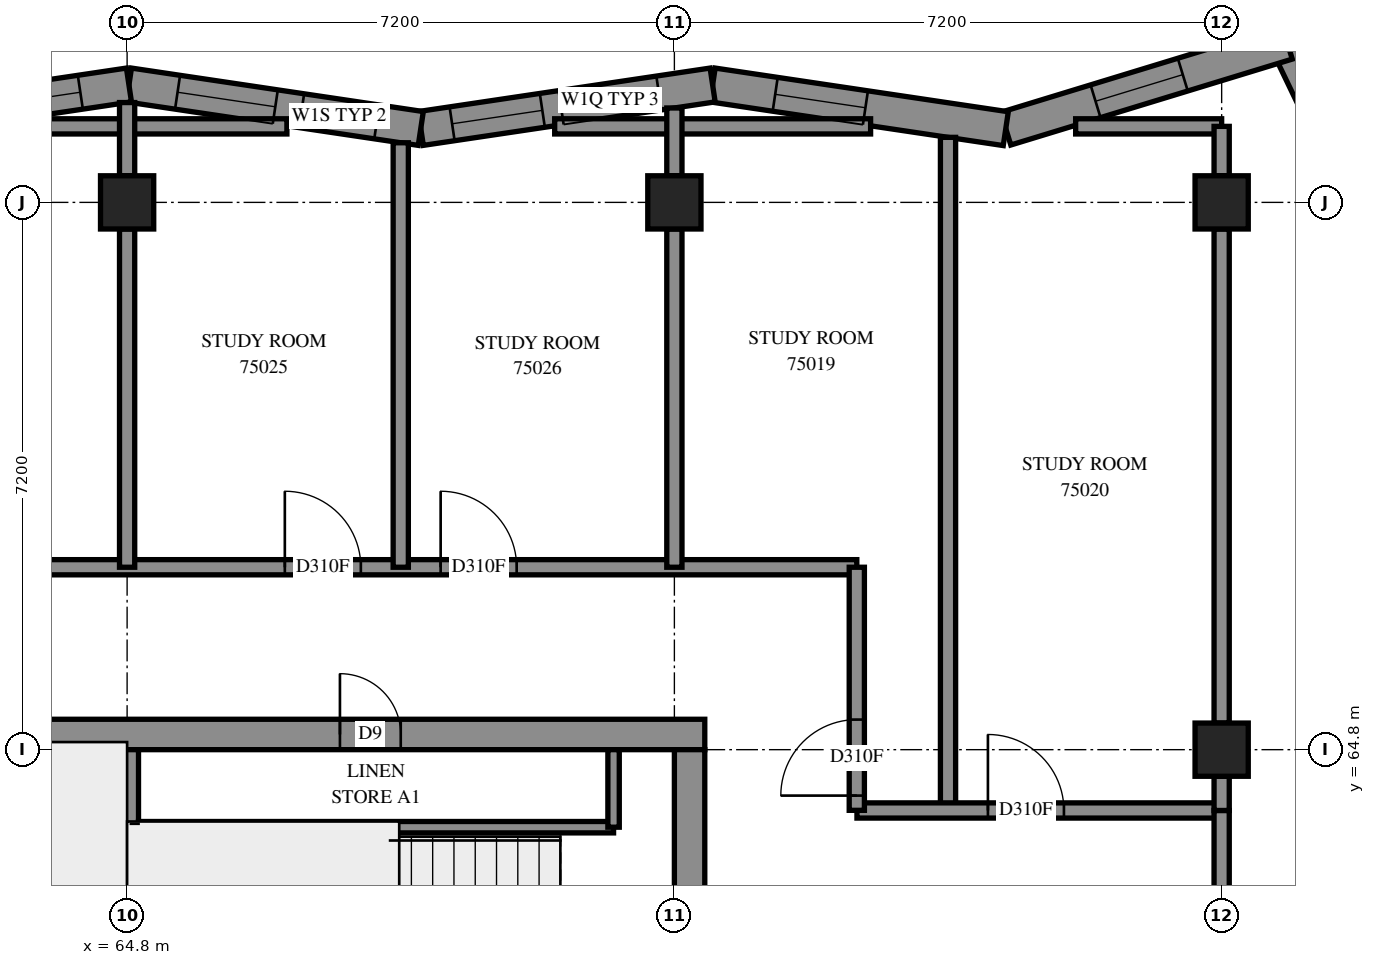
"""IFC4 building model, lengths in metres.
Left out: names, types, materials, properties, quantities, classifications, styles, units other than length and angle.
Written with IfcOpenShell. Run it as: python <this file> out.ifc"""

import sys

from ifc_helpers import new_model, si_unit, direction, frame, frame_2d, origin, origin_2d, place, context, subcontext, project, spatial, polyline, rectangle, outline, extrude, element, fill, save


model = new_model("IFC4")
c1 = context("Model", 3, precision=1e-05, world=origin(), true_north=direction((0.0, 1.0)))
c2 = subcontext(c1, "Body", "Model", "MODEL_VIEW")
j1 = project(units=[si_unit("LENGTHUNIT", "METRE"), si_unit("PLANEANGLEUNIT", "RADIAN")], contexts=[c1])
p1 = place(None, origin())
s1 = spatial("IfcSite", under=j1, at=p1, CompositionType="ELEMENT")
p2 = place(p1, origin())
s2 = spatial("IfcBuilding", under=s1, at=p2, CompositionType="ELEMENT")
p3 = place(p2, frame((0.0, 0.0, 274.4)))
s3 = spatial("IfcBuildingStorey", under=s2, at=p3, CompositionType="ELEMENT", Elevation=274.4)
for number, where, z_axis, x_axis in (
    (1, (64.8, 72.0, 0.0), (0.0, 0.0, 1.0), (1.0, 0.0, 0.0)),
    (2, (72.0, 72.0, 0.0), (0.0, 0.0, 1.0), (1.0, 0.0, 0.0)),
    (3, (79.2, 64.8, 0.0), (0.0, 0.0, 1.0), (1.0, 0.0, 0.0)),
    (4, (79.2, 72.0, 0.0), (0.0, 0.0, 1.0), (1.0, 0.0, 0.0)),
):
    element("IfcColumn", number, at=place(p3, frame(where, z_axis=z_axis, x_axis=x_axis)), inside=s3, PredefinedType="COLUMN", context=c2, shape_type="SweptSolid", body=[
        extrude(rectangle(XDim=0.7, YDim=0.7, at=origin_2d()), origin(), (0.0, 0.0, 1.0), 3.1),
    ])
p4 = place(p3, frame((57.2, 65.0, -0.3), z_axis=(0.0, 0.0, 1.0), x_axis=(1.0, 0.0, 0.0)))
e5 = element("IfcWall", 5, at=p4, inside=s3, PredefinedType="SHEAR", context=c2, shape_type="SweptSolid", body=[
    extrude(rectangle(XDim=15.2, YDim=0.4, at=frame_2d((7.6, 0.0))), origin(), (0.0, 0.0, 1.0), 2.7),
])
p5 = place(p4, frame((10.4, 0.0, 0.3)))
e6 = element("IfcOpeningElement", 6, at=p5, cuts=e5, PredefinedType="OPENING", context=c2, shape_type="SweptSolid", body=[
    extrude(rectangle(XDim=0.8, YDim=2.1, at=frame_2d((0.4, 1.05))), frame((0.0, 0.21, 0.0), z_axis=(0.0, -1.0, 0.0), x_axis=(1.0, 0.0, 0.0)), (0.0, 0.0, 1.0), 0.42),
])
p6 = place(p3, frame((72.2, 50.4, -0.3), z_axis=(0.0, 0.0, 1.0), x_axis=(0.0, 1.0, 0.0)))
e7 = element("IfcWall", 7, at=p6, inside=s3, PredefinedType="SHEAR", context=c2, shape_type="SweptSolid", body=[
    extrude(rectangle(XDim=14.4, YDim=0.4, at=frame_2d((7.2, 0.0))), origin(), (0.0, 0.0, 1.0), 2.7),
])
p7 = place(p6, frame((4.55, 0.0, 0.3)))
e8 = element("IfcOpeningElement", 8, at=p7, cuts=e7, PredefinedType="OPENING", context=c2, shape_type="SweptSolid", body=[
    extrude(rectangle(XDim=1.1, YDim=2.1, at=frame_2d((0.55, 1.05))), frame((0.0, 0.21, 0.0), z_axis=(0.0, -1.0, 0.0), x_axis=(1.0, 0.0, 0.0)), (0.0, 0.0, 1.0), 0.42),
])
p8 = place(p6, frame((11.35, 0.0, 0.3)))
e9 = element("IfcOpeningElement", 9, at=p8, cuts=e7, PredefinedType="OPENING", context=c2, shape_type="SweptSolid", body=[
    extrude(rectangle(XDim=1.1, YDim=2.1, at=frame_2d((0.55, 1.05))), frame((0.0, 0.21, 0.0), z_axis=(0.0, -1.0, 0.0), x_axis=(1.0, 0.0, 0.0)), (0.0, 0.0, 1.0), 0.42),
])
p9 = place(p3, frame((64.8, 60.6, 0.0), z_axis=(0.0, 0.0, 1.0), x_axis=(0.0, 1.0, 0.0)))
e10 = element("IfcWall", 10, at=p9, inside=s3, PredefinedType="SOLIDWALL", context=c2, shape_type="SweptSolid", body=[
    extrude(rectangle(XDim=4.2, YDim=0.3, at=frame_2d((2.1, 0.0))), origin(), (0.0, 0.0, 1.0), 3.1),
])
p10 = place(p3, frame((81.537, 71.033, 0.0), z_axis=(0.0, 0.0, 1.0), x_axis=(-0.4329584149, 0.9014138955, 0.0)))
e11 = element("IfcWall", 11, at=p10, inside=s3, PredefinedType="SOLIDWALL", context=c2, shape_type="SweptSolid", body=[
    extrude(outline(polyline([(0.058, -0.225), (3.596, -0.225), (3.21, 0.225), (-0.058, 0.225), (0.058, -0.225)])), origin(), (0.0, 0.0, 1.0), 3.1),
])
p11 = place(p10, frame((0.738, 0.0, 0.45)))
e12 = element("IfcOpeningElement", 12, at=p11, cuts=e11, PredefinedType="OPENING", context=c2, shape_type="SweptSolid", body=[
    extrude(rectangle(XDim=1.2, YDim=2.55, at=frame_2d((0.6, 1.275))), frame((0.0, 0.235, 0.0), z_axis=(0.0, -1.0, 0.0), x_axis=(1.0, 0.0, 0.0)), (0.0, 0.0, 1.0), 0.47),
])
p12 = place(p3, frame((80.063, 74.1, 0.0), z_axis=(0.0, 0.0, 1.0), x_axis=(-0.9564377374, -0.2919363877, 0.0)))
e13 = element("IfcWall", 13, at=p12, inside=s3, PredefinedType="SOLIDWALL", context=c2, shape_type="SweptSolid", body=[
    extrude(outline(polyline([(-0.193, -0.225), (3.821, -0.225), (3.923, 0.225), (0.193, 0.225), (-0.193, -0.225)])), origin(), (0.0, 0.0, 1.0), 3.1),
])
p13 = place(p12, frame((1.437, 0.0, 0.45)))
e14 = element("IfcOpeningElement", 14, at=p13, cuts=e13, PredefinedType="OPENING", context=c2, shape_type="SweptSolid", body=[
    extrude(rectangle(XDim=1.2, YDim=2.55, at=frame_2d((0.6, 1.275))), frame((0.0, 0.235, 0.0), z_axis=(0.0, -1.0, 0.0), x_axis=(1.0, 0.0, 0.0)), (0.0, 0.0, 1.0), 0.47),
])
p14 = place(p3, frame((76.36, 72.97, 0.0), z_axis=(0.0, 0.0, 1.0), x_axis=(-0.9890865204, 0.1473358586, 0.0)))
e15 = element("IfcWall", 15, at=p14, inside=s3, PredefinedType="SOLIDWALL", context=c2, shape_type="SweptSolid", body=[
    extrude(outline(polyline([(0.051, -0.225), (3.933, -0.225), (3.866, 0.225), (-0.051, 0.225), (0.051, -0.225)])), origin(), (0.0, 0.0, 1.0), 3.1),
])
p15 = place(p14, frame((1.867, 0.0, 0.45)))
e16 = element("IfcOpeningElement", 16, at=p15, cuts=e15, PredefinedType="OPENING", context=c2, shape_type="SweptSolid", body=[
    extrude(rectangle(XDim=1.2, YDim=2.55, at=frame_2d((0.6, 1.275))), frame((0.0, 0.235, 0.0), z_axis=(0.0, -1.0, 0.0), x_axis=(1.0, 0.0, 0.0)), (0.0, 0.0, 1.0), 0.47),
])
p16 = place(p3, frame((72.503, 73.544, 0.0), z_axis=(0.0, 0.0, 1.0), x_axis=(-0.9890847468, -0.1473477641, 0.0)))
e17 = element("IfcWall", 17, at=p16, inside=s3, PredefinedType="SOLIDWALL", context=c2, shape_type="SweptSolid", body=[
    extrude(outline(polyline([(-0.034, -0.225), (3.849, -0.225), (3.916, 0.225), (0.034, 0.225), (-0.034, -0.225)])), origin(), (0.0, 0.0, 1.0), 3.1),
])
p17 = place(p16, frame((0.716, 0.0, 0.45)))
e18 = element("IfcOpeningElement", 18, at=p17, cuts=e17, PredefinedType="OPENING", context=c2, shape_type="SweptSolid", body=[
    extrude(rectangle(XDim=1.3, YDim=2.5, at=frame_2d((0.65, 1.25))), frame((0.0, 0.235, 0.0), z_axis=(0.0, -1.0, 0.0), x_axis=(1.0, 0.0, 0.0)), (0.0, 0.0, 1.0), 0.47),
])
p18 = place(p16, frame((2.265, 0.0, 0.45)))
e19 = element("IfcOpeningElement", 19, at=p18, cuts=e17, PredefinedType="OPENING", context=c2, shape_type="SweptSolid", body=[
    extrude(rectangle(XDim=1.2, YDim=2.55, at=frame_2d((0.6, 1.275))), frame((0.0, 0.235, 0.0), z_axis=(0.0, -1.0, 0.0), x_axis=(1.0, 0.0, 0.0)), (0.0, 0.0, 1.0), 0.47),
])
p19 = place(p3, frame((68.664, 72.972, 0.0), z_axis=(0.0, 0.0, 1.0), x_axis=(-0.9890847468, 0.1473477641, 0.0)))
e20 = element("IfcWall", 20, at=p19, inside=s3, PredefinedType="SOLIDWALL", context=c2, shape_type="SweptSolid", body=[
    extrude(outline(polyline([(0.034, -0.225), (3.916, -0.225), (3.849, 0.225), (-0.034, 0.225), (0.034, -0.225)])), origin(), (0.0, 0.0, 1.0), 3.1),
])
p20 = place(p19, frame((0.585, 0.0, 0.45)))
e21 = element("IfcOpeningElement", 21, at=p20, cuts=e20, PredefinedType="OPENING", context=c2, shape_type="SweptSolid", body=[
    extrude(rectangle(XDim=1.0, YDim=2.5, at=frame_2d((0.5, 1.25))), frame((0.0, 0.235, 0.0), z_axis=(0.0, -1.0, 0.0), x_axis=(1.0, 0.0, 0.0)), (0.0, 0.0, 1.0), 0.47),
])
p21 = place(p19, frame((1.935, 0.0, 0.45)))
e22 = element("IfcOpeningElement", 22, at=p21, cuts=e20, PredefinedType="OPENING", context=c2, shape_type="SweptSolid", body=[
    extrude(rectangle(XDim=1.3, YDim=2.5, at=frame_2d((0.65, 1.25))), frame((0.0, 0.235, 0.0), z_axis=(0.0, -1.0, 0.0), x_axis=(1.0, 0.0, 0.0)), (0.0, 0.0, 1.0), 0.47),
])
p22 = place(p3, frame((64.824, 73.544, 0.0), z_axis=(0.0, 0.0, 1.0), x_axis=(-0.9890847468, -0.1473477641, 0.0)))
e23 = element("IfcWall", 23, at=p22, inside=s3, PredefinedType="SOLIDWALL", context=c2, shape_type="SweptSolid", body=[
    extrude(outline(polyline([(-0.034, -0.225), (3.849, -0.225), (3.916, 0.225), (0.034, 0.225), (-0.034, -0.225)])), origin(), (0.0, 0.0, 1.0), 3.1),
])
p23 = place(p22, frame((0.647, 0.0, 0.45)))
e24 = element("IfcOpeningElement", 24, at=p23, cuts=e23, PredefinedType="OPENING", context=c2, shape_type="SweptSolid", body=[
    extrude(rectangle(XDim=1.3, YDim=2.5, at=frame_2d((0.65, 1.25))), frame((0.0, 0.235, 0.0), z_axis=(0.0, -1.0, 0.0), x_axis=(1.0, 0.0, 0.0)), (0.0, 0.0, 1.0), 0.47),
])
p24 = place(p22, frame((2.297, 0.0, 0.45)))
e25 = element("IfcOpeningElement", 25, at=p24, cuts=e23, PredefinedType="OPENING", context=c2, shape_type="SweptSolid", body=[
    extrude(rectangle(XDim=1.0, YDim=2.5, at=frame_2d((0.5, 1.25))), frame((0.0, 0.235, 0.0), z_axis=(0.0, -1.0, 0.0), x_axis=(1.0, 0.0, 0.0)), (0.0, 0.0, 1.0), 0.47),
])
p25 = place(p3, frame((64.95, 63.78, 0.0), z_axis=(0.0, 0.0, 1.0), x_axis=(1.0, 0.0, 0.0)))
e26 = element("IfcWall", 26, at=p25, inside=s3, PredefinedType="PARTITIONING", context=c2, shape_type="SweptSolid", body=[
    extrude(rectangle(XDim=6.25, YDim=0.15, at=frame_2d((3.125, 0.0))), origin(), (0.0, 0.0, 1.0), 3.1),
])
p26 = place(p3, frame((71.2, 63.78, 0.0), z_axis=(0.0, 0.0, 1.0), x_axis=(0.0, 1.0, 0.0)))
e27 = element("IfcWall", 27, at=p26, inside=s3, PredefinedType="PARTITIONING", context=c2, shape_type="SweptSolid", body=[
    extrude(rectangle(XDim=1.02, YDim=0.15, at=frame_2d((0.51, 0.0))), origin(), (0.0, 0.0, 1.0), 3.1),
])
p27 = place(p3, frame((55.2, 67.2, 0.0), z_axis=(0.0, 0.0, 1.0), x_axis=(1.0, 0.0, 0.0)))
e28 = element("IfcWall", 28, at=p27, inside=s3, PredefinedType="PARTITIONING", context=c2, shape_type="SweptSolid", body=[
    extrude(rectangle(XDim=19.2, YDim=0.2, at=frame_2d((9.6, 0.0))), origin(), (0.0, 0.0, 1.0), 3.1),
])
p28 = place(p27, frame((6.108, 0.0, 0.0)))
e29 = element("IfcOpeningElement", 29, at=p28, cuts=e28, PredefinedType="OPENING", context=c2, shape_type="SweptSolid", body=[
    extrude(rectangle(XDim=0.9, YDim=2.1, at=frame_2d((0.45, 1.05))), frame((0.0, 0.11, 0.0), z_axis=(0.0, -1.0, 0.0), x_axis=(1.0, 0.0, 0.0)), (0.0, 0.0, 1.0), 0.22),
])
p29 = place(p27, frame((11.675, 0.0, 0.0)))
e30 = element("IfcOpeningElement", 30, at=p29, cuts=e28, PredefinedType="OPENING", context=c2, shape_type="SweptSolid", body=[
    extrude(rectangle(XDim=1.0, YDim=2.1, at=frame_2d((0.5, 1.05))), frame((0.0, 0.11, 0.0), z_axis=(0.0, -1.0, 0.0), x_axis=(1.0, 0.0, 0.0)), (0.0, 0.0, 1.0), 0.22),
])
p30 = place(p27, frame((13.725, 0.0, 0.0)))
e31 = element("IfcOpeningElement", 31, at=p30, cuts=e28, PredefinedType="OPENING", context=c2, shape_type="SweptSolid", body=[
    extrude(rectangle(XDim=1.0, YDim=2.1, at=frame_2d((0.5, 1.05))), frame((0.0, 0.11, 0.0), z_axis=(0.0, -1.0, 0.0), x_axis=(1.0, 0.0, 0.0)), (0.0, 0.0, 1.0), 0.22),
])
p31 = place(p3, frame((75.6, 64.0, 0.0), z_axis=(0.0, 0.0, 1.0), x_axis=(0.0, 1.0, 0.0)))
e32 = element("IfcWall", 32, at=p31, inside=s3, PredefinedType="PARTITIONING", context=c2, shape_type="SweptSolid", body=[
    extrude(rectangle(XDim=8.856, YDim=0.2, at=frame_2d((4.428, 0.0))), origin(), (0.0, 0.0, 1.0), 3.1),
])
p32 = place(p3, frame((79.2, 65.15, 0.0), z_axis=(0.0, 0.0, 1.0), x_axis=(0.0, 1.0, 0.0)))
e33 = element("IfcWall", 33, at=p32, inside=s3, PredefinedType="PARTITIONING", context=c2, shape_type="SweptSolid", body=[
    extrude(rectangle(XDim=6.5, YDim=0.2, at=frame_2d((3.25, 0.0))), origin(), (0.0, 0.0, 1.0), 3.1),
])
p33 = place(p3, frame((68.4, 67.2, 0.0), z_axis=(0.0, 0.0, 1.0), x_axis=(0.0, 1.0, 0.0)))
e34 = element("IfcWall", 34, at=p33, inside=s3, PredefinedType="PARTITIONING", context=c2, shape_type="SweptSolid", body=[
    extrude(rectangle(XDim=5.584, YDim=0.2, at=frame_2d((2.792, 0.0))), origin(), (0.0, 0.0, 1.0), 3.1),
])
p34 = place(p3, frame((74.402, 64.0, 0.0), z_axis=(0.0, 0.0, 1.0), x_axis=(1.0, 0.0, 0.0)))
e35 = element("IfcWall", 35, at=p34, inside=s3, PredefinedType="PARTITIONING", context=c2, shape_type="SweptSolid", body=[
    extrude(rectangle(XDim=4.798, YDim=0.2, at=frame_2d((2.399, 0.0))), origin(), (0.0, 0.0, 1.0), 3.1),
])
p35 = place(p34, frame((1.723, 0.0, 0.0)))
e36 = element("IfcOpeningElement", 36, at=p35, cuts=e35, PredefinedType="OPENING", context=c2, shape_type="SweptSolid", body=[
    extrude(rectangle(XDim=1.0, YDim=2.1, at=frame_2d((0.5, 1.05))), frame((0.0, 0.11, 0.0), z_axis=(0.0, -1.0, 0.0), x_axis=(1.0, 0.0, 0.0)), (0.0, 0.0, 1.0), 0.22),
])
for number, where, z_axis, x_axis in (
    (37, (64.8, 67.2, 0.0), (0.0, 0.0, 1.0), (0.0, 1.0, 0.0)),
    (38, (72.0, 67.2, 0.0), (0.0, 0.0, 1.0), (0.0, 1.0, 0.0)),
):
    element("IfcWall", number, at=place(p3, frame(where, z_axis=z_axis, x_axis=x_axis)), inside=s3, PredefinedType="PARTITIONING", context=c2, shape_type="SweptSolid", body=[
        extrude(rectangle(XDim=4.45, YDim=0.2, at=frame_2d((2.225, 0.0))), origin(), (0.0, 0.0, 1.0), 3.1),
    ])
p36 = place(p3, frame((62.746, 73.0, 0.0), z_axis=(0.0, 0.0, 1.0), x_axis=(1.0, 0.0, 0.0)))
e39 = element("IfcWall", 39, at=p36, inside=s3, PredefinedType="PARTITIONING", context=c2, shape_type="SweptSolid", body=[
    extrude(rectangle(XDim=4.156, YDim=0.2, at=frame_2d((2.078, 0.0))), origin(), (0.0, 0.0, 1.0), 3.1),
])
p37 = place(p3, frame((70.425, 73.0, 0.0), z_axis=(0.0, 0.0, 1.0), x_axis=(1.0, 0.0, 0.0)))
e40 = element("IfcWall", 40, at=p37, inside=s3, PredefinedType="PARTITIONING", context=c2, shape_type="SweptSolid", body=[
    extrude(rectangle(XDim=4.156, YDim=0.2, at=frame_2d((2.078, 0.0))), origin(), (0.0, 0.0, 1.0), 3.1),
])
p38 = place(p3, frame((74.4, 64.002, 0.0), z_axis=(0.0, 0.0, 1.0), x_axis=(0.0, 1.0, 0.0)))
e41 = element("IfcWall", 41, at=p38, inside=s3, PredefinedType="PARTITIONING", context=c2, shape_type="SweptSolid", body=[
    extrude(rectangle(XDim=3.198, YDim=0.2, at=frame_2d((1.599, 0.0))), origin(), (0.0, 0.0, 1.0), 3.1),
])
p39 = place(p38, frame((0.194, 0.0, 0.0)))
e42 = element("IfcOpeningElement", 42, at=p39, cuts=e41, PredefinedType="OPENING", context=c2, shape_type="SweptSolid", body=[
    extrude(rectangle(XDim=1.0, YDim=2.1, at=frame_2d((0.5, 1.05))), frame((0.0, 0.11, 0.0), z_axis=(0.0, -1.0, 0.0), x_axis=(1.0, 0.0, 0.0)), (0.0, 0.0, 1.0), 0.22),
])
p40 = place(p3, frame((79.2, 62.0, 0.0), z_axis=(0.0, 0.0, 1.0), x_axis=(0.0, 1.0, 0.0)))
e43 = element("IfcWall", 43, at=p40, inside=s3, PredefinedType="PARTITIONING", context=c2, shape_type="SweptSolid", body=[
    extrude(rectangle(XDim=2.0, YDim=0.2, at=frame_2d((1.0, 0.0))), origin(), (0.0, 0.0, 1.0), 3.1),
])
p41 = place(p3, frame((77.279, 73.0, 0.0), z_axis=(0.0, 0.0, 1.0), x_axis=(1.0, 0.0, 0.0)))
e44 = element("IfcWall", 44, at=p41, inside=s3, PredefinedType="PARTITIONING", context=c2, shape_type="SweptSolid", body=[
    extrude(rectangle(XDim=1.921, YDim=0.2, at=frame_2d((0.961, 0.0))), origin(), (0.0, 0.0, 1.0), 3.1),
])
p42 = place(p3, frame((64.8, 72.35, 0.0), z_axis=(0.0, 0.0, 1.0), x_axis=(0.0, 1.0, 0.0)))
e45 = element("IfcWall", 45, at=p42, inside=s3, PredefinedType="PARTITIONING", context=c2, shape_type="SweptSolid", body=[
    extrude(rectangle(XDim=0.963, YDim=0.2, at=frame_2d((0.482, 0.0))), origin(), (0.0, 0.0, 1.0), 3.1),
])
p43 = place(p3, frame((72.0, 72.35, 0.0), z_axis=(0.0, 0.0, 1.0), x_axis=(0.0, 1.0, 0.0)))
e46 = element("IfcWall", 46, at=p43, inside=s3, PredefinedType="PARTITIONING", context=c2, shape_type="SweptSolid", body=[
    extrude(rectangle(XDim=0.892, YDim=0.2, at=frame_2d((0.446, 0.0))), origin(), (0.0, 0.0, 1.0), 3.1),
])
p44 = place(p3, frame((79.2, 72.35, 0.0), z_axis=(0.0, 0.0, 1.0), x_axis=(0.0, 1.0, 0.0)))
e47 = element("IfcWall", 47, at=p44, inside=s3, PredefinedType="PARTITIONING", context=c2, shape_type="SweptSolid", body=[
    extrude(rectangle(XDim=0.65, YDim=0.2, at=frame_2d((0.325, 0.0))), origin(), (0.0, 0.0, 1.0), 3.1),
])
p45 = place(p3, frame((79.2, 64.0, 0.0), z_axis=(0.0, 0.0, 1.0), x_axis=(0.0, 1.0, 0.0)))
e48 = element("IfcWall", 48, at=p45, inside=s3, PredefinedType="PARTITIONING", context=c2, shape_type="SweptSolid", body=[
    extrude(rectangle(XDim=0.45, YDim=0.2, at=frame_2d((0.225, 0.0))), origin(), (0.0, 0.0, 1.0), 3.1),
])
p46 = place(p13, origin())
e49 = element("IfcWindow", 49, at=p46, inside=s3, PartitioningType="SINGLE_PANEL", PredefinedType="WINDOW", context=c2, shape_type="SweptSolid", body=[
    extrude(rectangle(XDim=1.2, YDim=2.55, at=frame_2d((0.6, 1.275))), frame((0.0, 0.205, 0.0), z_axis=(0.0, -1.0, 0.0), x_axis=(1.0, 0.0, 0.0)), (0.0, 0.0, 1.0), 0.06),
])
fill(e14, e49)
p47 = place(p15, origin())
e50 = element("IfcWindow", 50, at=p47, inside=s3, PartitioningType="SINGLE_PANEL", PredefinedType="WINDOW", context=c2, shape_type="SweptSolid", body=[
    extrude(rectangle(XDim=1.2, YDim=2.55, at=frame_2d((0.6, 1.275))), frame((0.0, 0.115, 0.0), z_axis=(0.0, -1.0, 0.0), x_axis=(1.0, 0.0, 0.0)), (0.0, 0.0, 1.0), 0.06),
])
fill(e16, e50)
p48 = place(p5, origin())
e51 = element("IfcDoor", 51, at=p48, inside=s3, OperationType="SINGLE_SWING_RIGHT", PredefinedType="DOOR", context=c2, shape_type="SweptSolid", body=[
    extrude(rectangle(XDim=0.8, YDim=2.1, at=frame_2d((0.4, 1.05))), frame((0.0, 0.025, 0.0), z_axis=(0.0, -1.0, 0.0), x_axis=(1.0, 0.0, 0.0)), (0.0, 0.0, 1.0), 0.05),
])
fill(e6, e51)
p49 = place(p39, origin())
e52 = element("IfcDoor", 52, at=p49, inside=s3, OperationType="SINGLE_SWING_RIGHT", PredefinedType="DOOR", context=c2, shape_type="SweptSolid", body=[
    extrude(rectangle(XDim=1.0, YDim=2.1, at=frame_2d((0.5, 1.05))), frame((0.0, 0.025, 0.0), z_axis=(0.0, -1.0, 0.0), x_axis=(1.0, 0.0, 0.0)), (0.0, 0.0, 1.0), 0.05),
])
fill(e42, e52)
p50 = place(p35, origin())
e53 = element("IfcDoor", 53, at=p50, inside=s3, OperationType="SINGLE_SWING_LEFT", PredefinedType="DOOR", context=c2, shape_type="SweptSolid", body=[
    extrude(rectangle(XDim=1.0, YDim=2.1, at=frame_2d((0.5, 1.05))), frame((0.0, 0.025, 0.0), z_axis=(0.0, -1.0, 0.0), x_axis=(1.0, 0.0, 0.0)), (0.0, 0.0, 1.0), 0.05),
])
fill(e36, e53)
p51 = place(p29, origin())
e54 = element("IfcDoor", 54, at=p51, inside=s3, OperationType="SINGLE_SWING_RIGHT", PredefinedType="DOOR", context=c2, shape_type="SweptSolid", body=[
    extrude(rectangle(XDim=1.0, YDim=2.1, at=frame_2d((0.5, 1.05))), frame((0.0, 0.025, 0.0), z_axis=(0.0, -1.0, 0.0), x_axis=(1.0, 0.0, 0.0)), (0.0, 0.0, 1.0), 0.05),
])
fill(e30, e54)
p52 = place(p30, origin())
e55 = element("IfcDoor", 55, at=p52, inside=s3, OperationType="SINGLE_SWING_LEFT", PredefinedType="DOOR", context=c2, shape_type="SweptSolid", body=[
    extrude(rectangle(XDim=1.0, YDim=2.1, at=frame_2d((0.5, 1.05))), frame((0.0, 0.025, 0.0), z_axis=(0.0, -1.0, 0.0), x_axis=(1.0, 0.0, 0.0)), (0.0, 0.0, 1.0), 0.05),
])
fill(e31, e55)
p53 = place(p17, origin())
e56 = element("IfcWindow", 56, at=p53, inside=s3, PartitioningType="SINGLE_PANEL", PredefinedType="WINDOW", context=c2, shape_type="SweptSolid", body=[
    extrude(rectangle(XDim=1.3, YDim=2.5, at=frame_2d((0.65, 1.25))), frame((0.0, 0.115, 0.0), z_axis=(0.0, -1.0, 0.0), x_axis=(1.0, 0.0, 0.0)), (0.0, 0.0, 1.0), 0.06),
])
fill(e18, e56)
p54 = place(p18, origin())
e57 = element("IfcWindow", 57, at=p54, inside=s3, PartitioningType="SINGLE_PANEL", PredefinedType="WINDOW", context=c2, shape_type="SweptSolid", body=[
    extrude(rectangle(XDim=1.2, YDim=2.55, at=frame_2d((0.6, 1.275))), frame((0.0, 0.205, 0.0), z_axis=(0.0, -1.0, 0.0), x_axis=(1.0, 0.0, 0.0)), (0.0, 0.0, 1.0), 0.06),
])
fill(e19, e57)
p55 = place(p20, origin())
e58 = element("IfcWindow", 58, at=p55, inside=s3, PartitioningType="SINGLE_PANEL", PredefinedType="WINDOW", context=c2, shape_type="SweptSolid", body=[
    extrude(rectangle(XDim=1.0, YDim=2.5, at=frame_2d((0.5, 1.25))), frame((0.0, 0.205, 0.0), z_axis=(0.0, -1.0, 0.0), x_axis=(1.0, 0.0, 0.0)), (0.0, 0.0, 1.0), 0.06),
])
fill(e21, e58)
p56 = place(p21, origin())
e59 = element("IfcWindow", 59, at=p56, inside=s3, PartitioningType="SINGLE_PANEL", PredefinedType="WINDOW", context=c2, shape_type="SweptSolid", body=[
    extrude(rectangle(XDim=1.3, YDim=2.5, at=frame_2d((0.65, 1.25))), frame((0.0, 0.125, 0.0), z_axis=(0.0, -1.0, 0.0), x_axis=(1.0, 0.0, 0.0)), (0.0, 0.0, 1.0), 0.06),
])
fill(e22, e59)
p57 = place(p23, origin())
e60 = element("IfcWindow", 60, at=p57, inside=s3, PartitioningType="SINGLE_PANEL", PredefinedType="WINDOW", context=c2, shape_type="SweptSolid", body=[
    extrude(rectangle(XDim=1.3, YDim=2.5, at=frame_2d((0.65, 1.25))), frame((0.0, 0.125, 0.0), z_axis=(0.0, -1.0, 0.0), x_axis=(1.0, 0.0, 0.0)), (0.0, 0.0, 1.0), 0.06),
])
fill(e24, e60)
save(model, sys.argv[1])
